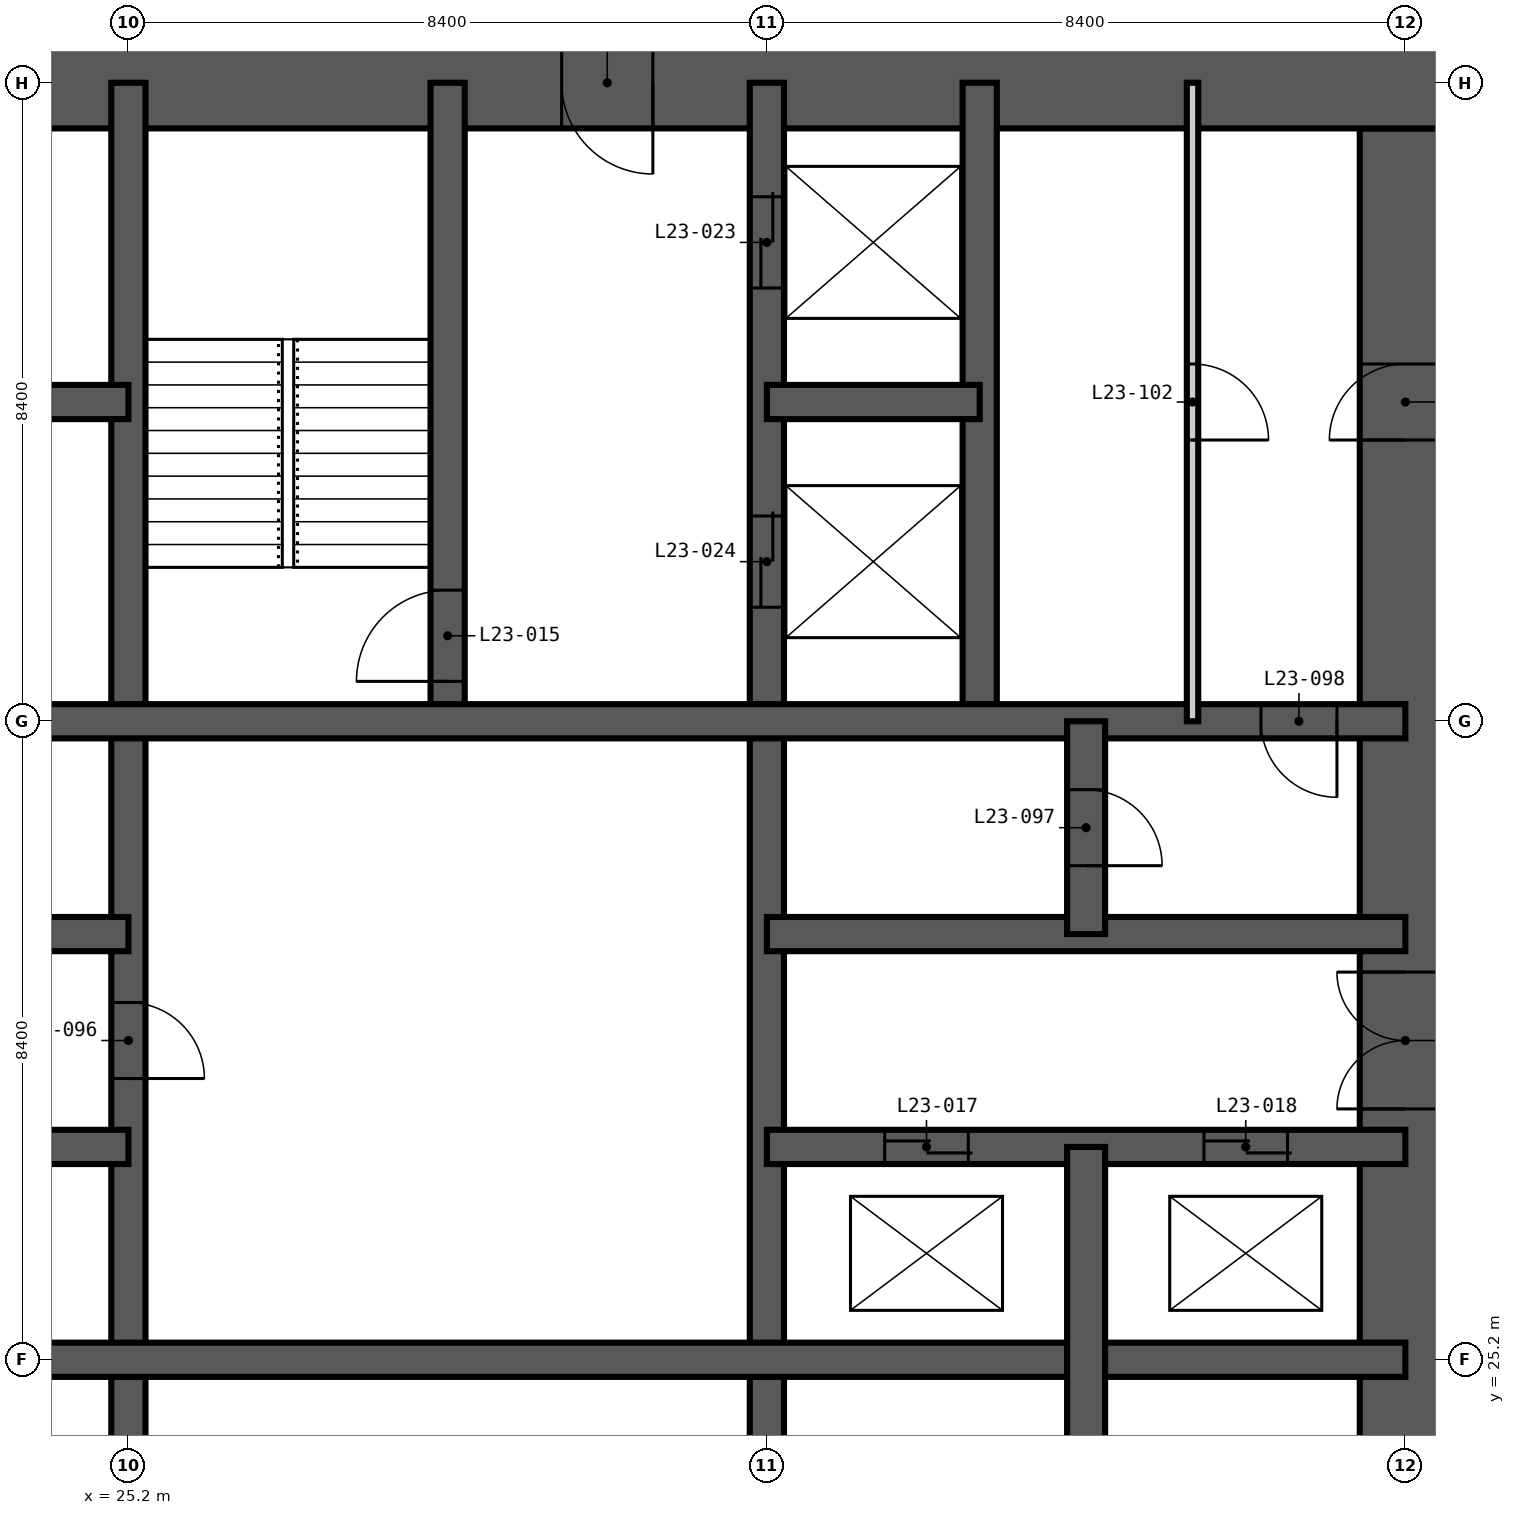
"""IFC4 building model, lengths in metres.
Left out: names, types, materials, properties, quantities, classifications, styles, units other than length and angle.
Written with IfcOpenShell. Run it as: python <this file> out.ifc"""

import sys

from ifc_helpers import new_model, si_unit, direction, frame, frame_2d, origin, place, context, subcontext, project, spatial, rectangle, extrude, element, fill, save


model = new_model("IFC4")
c1 = context("Model", 3, precision=1e-05, world=origin(), true_north=direction((0.0, 1.0)))
c2 = subcontext(c1, "Body", "Model", "MODEL_VIEW")
j1 = project(units=[si_unit("LENGTHUNIT", "METRE"), si_unit("PLANEANGLEUNIT", "RADIAN")], contexts=[c1])
p1 = place(None, origin())
s1 = spatial("IfcSite", under=j1, at=p1, CompositionType="ELEMENT")
p2 = place(p1, origin())
s2 = spatial("IfcBuilding", under=s1, at=p2, CompositionType="ELEMENT")
p3 = place(p2, frame((0.0, 0.0, 93.6)))
s3 = spatial("IfcBuildingStorey", under=s2, at=p3, CompositionType="ELEMENT", Elevation=93.6)
p4 = place(p3, frame((42.0, 17.4, -0.35), z_axis=(0.0, 0.0, 1.0), x_axis=(0.0, 1.0, 0.0)))
e1 = element("IfcWall", 1, at=p4, inside=s3, PredefinedType="SHEAR", context=c2, shape_type="SweptSolid", body=[
    extrude(rectangle(XDim=24.0, YDim=1.2, at=frame_2d((12.0, 0.0))), origin(), (0.0, 0.0, 1.0), 3.6),
])
p5 = place(p4, frame((0.2, 0.0, 0.35)))
e2 = element("IfcOpeningElement", 2, at=p5, cuts=e1, PredefinedType="OPENING", context=c2, shape_type="SweptSolid", body=[
    extrude(rectangle(XDim=1.2, YDim=2.2, at=frame_2d((0.6, 1.1))), frame((0.0, 0.61, 0.0), z_axis=(0.0, -1.0, 0.0), x_axis=(1.0, 0.0, 0.0)), (0.0, 0.0, 1.0), 1.22),
])
p6 = place(p4, frame((11.1, 0.0, 0.35)))
e3 = element("IfcOpeningElement", 3, at=p6, cuts=e1, PredefinedType="OPENING", context=c2, shape_type="SweptSolid", body=[
    extrude(rectangle(XDim=1.8, YDim=2.2, at=frame_2d((0.9, 1.1))), frame((0.0, 0.61, 0.0), z_axis=(0.0, -1.0, 0.0), x_axis=(1.0, 0.0, 0.0)), (0.0, 0.0, 1.0), 1.22),
])
p7 = place(p4, frame((19.9, 0.0, 0.35)))
e4 = element("IfcOpeningElement", 4, at=p7, cuts=e1, PredefinedType="OPENING", context=c2, shape_type="SweptSolid", body=[
    extrude(rectangle(XDim=1.0, YDim=2.1, at=frame_2d((0.5, 1.05))), frame((0.0, 0.61, 0.0), z_axis=(0.0, -1.0, 0.0), x_axis=(1.0, 0.0, 0.0)), (0.0, 0.0, 1.0), 1.22),
])
p8 = place(p3, frame((42.6, 42.0, -0.35), z_axis=(0.0, 0.0, 1.0), x_axis=(-1.0, 0.0, 0.0)))
e5 = element("IfcWall", 5, at=p8, inside=s3, PredefinedType="SHEAR", context=c2, shape_type="SweptSolid", body=[
    extrude(rectangle(XDim=26.4, YDim=1.2, at=frame_2d((13.2, 0.0))), origin(), (0.0, 0.0, 1.0), 3.6),
])
p9 = place(p8, frame((21.1, 0.0, 0.35)))
e6 = element("IfcOpeningElement", 6, at=p9, cuts=e5, PredefinedType="OPENING", context=c2, shape_type="SweptSolid", body=[
    extrude(rectangle(XDim=1.0, YDim=2.1, at=frame_2d((0.5, 1.05))), frame((0.0, 0.61, 0.0), z_axis=(0.0, -1.0, 0.0), x_axis=(1.0, 0.0, 0.0)), (0.0, 0.0, 1.0), 1.22),
])
p10 = place(p8, frame((10.5, 0.0, 0.35)))
e7 = element("IfcOpeningElement", 7, at=p10, cuts=e5, PredefinedType="OPENING", context=c2, shape_type="SweptSolid", body=[
    extrude(rectangle(XDim=1.2, YDim=2.2, at=frame_2d((0.6, 1.1))), frame((0.0, 0.61, 0.0), z_axis=(0.0, -1.0, 0.0), x_axis=(1.0, 0.0, 0.0)), (0.0, 0.0, 1.0), 1.22),
])
p11 = place(p3, frame((25.2, 16.8, -0.35), z_axis=(0.0, 0.0, 1.0), x_axis=(0.0, 1.0, 0.0)))
e8 = element("IfcWall", 8, at=p11, inside=s3, PredefinedType="SHEAR", context=c2, shape_type="SweptSolid", body=[
    extrude(rectangle(XDim=25.2, YDim=0.45, at=frame_2d((12.6, 0.0))), origin(), (0.0, 0.0, 1.0), 3.6),
])
p12 = place(p11, frame((12.1, 0.0, 0.35)))
e9 = element("IfcOpeningElement", 9, at=p12, cuts=e8, PredefinedType="OPENING", context=c2, shape_type="SweptSolid", body=[
    extrude(rectangle(XDim=1.0, YDim=2.1, at=frame_2d((0.5, 1.05))), frame((0.0, 0.235, 0.0), z_axis=(0.0, -1.0, 0.0), x_axis=(1.0, 0.0, 0.0)), (0.0, 0.0, 1.0), 0.47),
])
p13 = place(p3, frame((29.4, 33.6, -0.35), z_axis=(0.0, 0.0, 1.0), x_axis=(0.0, 1.0, 0.0)))
e10 = element("IfcWall", 10, at=p13, inside=s3, PredefinedType="SHEAR", context=c2, shape_type="SweptSolid", body=[
    extrude(rectangle(XDim=8.4, YDim=0.45, at=frame_2d((4.2, 0.0))), origin(), (0.0, 0.0, 1.0), 3.6),
])
p14 = place(p13, frame((0.525, 0.0, 0.35)))
e11 = element("IfcOpeningElement", 11, at=p14, cuts=e10, PredefinedType="OPENING", context=c2, shape_type="SweptSolid", body=[
    extrude(rectangle(XDim=1.2, YDim=2.2, at=frame_2d((0.6, 1.1))), frame((0.0, 0.235, 0.0), z_axis=(0.0, -1.0, 0.0), x_axis=(1.0, 0.0, 0.0)), (0.0, 0.0, 1.0), 0.47),
])
p15 = place(p3, frame((33.6, 16.8, -0.35), z_axis=(0.0, 0.0, 1.0), x_axis=(0.0, 1.0, 0.0)))
e12 = element("IfcWall", 12, at=p15, inside=s3, PredefinedType="SHEAR", context=c2, shape_type="SweptSolid", body=[
    extrude(rectangle(XDim=25.2, YDim=0.45, at=frame_2d((12.6, 0.0))), origin(), (0.0, 0.0, 1.0), 3.6),
])
p16 = place(p15, frame((22.5, 0.0, 0.35)))
e13 = element("IfcOpeningElement", 13, at=p16, cuts=e12, PredefinedType="OPENING", context=c2, shape_type="SweptSolid", body=[
    extrude(rectangle(XDim=1.2, YDim=2.2, at=frame_2d((0.6, 1.1))), frame((0.0, 0.235, 0.0), z_axis=(0.0, -1.0, 0.0), x_axis=(1.0, 0.0, 0.0)), (0.0, 0.0, 1.0), 0.47),
])
p17 = place(p15, frame((18.3, 0.0, 0.35)))
e14 = element("IfcOpeningElement", 14, at=p17, cuts=e12, PredefinedType="OPENING", context=c2, shape_type="SweptSolid", body=[
    extrude(rectangle(XDim=1.2, YDim=2.2, at=frame_2d((0.6, 1.1))), frame((0.0, 0.235, 0.0), z_axis=(0.0, -1.0, 0.0), x_axis=(1.0, 0.0, 0.0)), (0.0, 0.0, 1.0), 0.47),
])
p18 = place(p3, frame((36.4, 33.6, -0.35), z_axis=(0.0, 0.0, 1.0), x_axis=(0.0, 1.0, 0.0)))
e15 = element("IfcWall", 15, at=p18, inside=s3, PredefinedType="SHEAR", context=c2, shape_type="SweptSolid", body=[
    extrude(rectangle(XDim=8.4, YDim=0.45, at=frame_2d((4.2, 0.0))), origin(), (0.0, 0.0, 1.0), 3.6),
])
p19 = place(p3, frame((16.8, 25.2, -0.35), z_axis=(0.0, 0.0, 1.0), x_axis=(1.0, 0.0, 0.0)))
e16 = element("IfcWall", 16, at=p19, inside=s3, PredefinedType="SHEAR", context=c2, shape_type="SweptSolid", body=[
    extrude(rectangle(XDim=25.2, YDim=0.45, at=frame_2d((12.6, 0.0))), origin(), (0.0, 0.0, 1.0), 3.6),
])
p20 = place(p3, frame((16.8, 28.0, -0.35), z_axis=(0.0, 0.0, 1.0), x_axis=(1.0, 0.0, 0.0)))
e17 = element("IfcWall", 17, at=p20, inside=s3, PredefinedType="SHEAR", context=c2, shape_type="SweptSolid", body=[
    extrude(rectangle(XDim=8.4, YDim=0.45, at=frame_2d((4.2, 0.0))), origin(), (0.0, 0.0, 1.0), 3.6),
])
p21 = place(p20, frame((1.55, 0.0, 0.35)))
e18 = element("IfcOpeningElement", 18, at=p21, cuts=e17, PredefinedType="OPENING", context=c2, shape_type="SweptSolid", body=[
    extrude(rectangle(XDim=1.1, YDim=2.2, at=frame_2d((0.55, 1.1))), frame((0.0, 0.235, 0.0), z_axis=(0.0, -1.0, 0.0), x_axis=(1.0, 0.0, 0.0)), (0.0, 0.0, 1.0), 0.47),
])
p22 = place(p20, frame((5.75, 0.0, 0.35)))
e19 = element("IfcOpeningElement", 19, at=p22, cuts=e17, PredefinedType="OPENING", context=c2, shape_type="SweptSolid", body=[
    extrude(rectangle(XDim=1.1, YDim=2.2, at=frame_2d((0.55, 1.1))), frame((0.0, 0.235, 0.0), z_axis=(0.0, -1.0, 0.0), x_axis=(1.0, 0.0, 0.0)), (0.0, 0.0, 1.0), 0.47),
])
p23 = place(p3, frame((33.6, 28.0, -0.35), z_axis=(0.0, 0.0, 1.0), x_axis=(1.0, 0.0, 0.0)))
e20 = element("IfcWall", 20, at=p23, inside=s3, PredefinedType="SHEAR", context=c2, shape_type="SweptSolid", body=[
    extrude(rectangle(XDim=8.4, YDim=0.45, at=frame_2d((4.2, 0.0))), origin(), (0.0, 0.0, 1.0), 3.6),
])
p24 = place(p23, frame((1.55, 0.0, 0.35)))
e21 = element("IfcOpeningElement", 21, at=p24, cuts=e20, PredefinedType="OPENING", context=c2, shape_type="SweptSolid", body=[
    extrude(rectangle(XDim=1.1, YDim=2.2, at=frame_2d((0.55, 1.1))), frame((0.0, 0.235, 0.0), z_axis=(0.0, -1.0, 0.0), x_axis=(1.0, 0.0, 0.0)), (0.0, 0.0, 1.0), 0.47),
])
p25 = place(p23, frame((5.75, 0.0, 0.35)))
e22 = element("IfcOpeningElement", 22, at=p25, cuts=e20, PredefinedType="OPENING", context=c2, shape_type="SweptSolid", body=[
    extrude(rectangle(XDim=1.1, YDim=2.2, at=frame_2d((0.55, 1.1))), frame((0.0, 0.235, 0.0), z_axis=(0.0, -1.0, 0.0), x_axis=(1.0, 0.0, 0.0)), (0.0, 0.0, 1.0), 0.47),
])
p26 = place(p3, frame((16.8, 30.8, -0.35), z_axis=(0.0, 0.0, 1.0), x_axis=(1.0, 0.0, 0.0)))
e23 = element("IfcWall", 23, at=p26, inside=s3, PredefinedType="SHEAR", context=c2, shape_type="SweptSolid", body=[
    extrude(rectangle(XDim=8.4, YDim=0.45, at=frame_2d((4.2, 0.0))), origin(), (0.0, 0.0, 1.0), 3.6),
])
p27 = place(p26, frame((1.55, 0.0, 0.35)))
e24 = element("IfcOpeningElement", 24, at=p27, cuts=e23, PredefinedType="OPENING", context=c2, shape_type="SweptSolid", body=[
    extrude(rectangle(XDim=1.1, YDim=2.2, at=frame_2d((0.55, 1.1))), frame((0.0, 0.235, 0.0), z_axis=(0.0, -1.0, 0.0), x_axis=(1.0, 0.0, 0.0)), (0.0, 0.0, 1.0), 0.47),
])
p28 = place(p26, frame((5.75, 0.0, 0.35)))
e25 = element("IfcOpeningElement", 25, at=p28, cuts=e23, PredefinedType="OPENING", context=c2, shape_type="SweptSolid", body=[
    extrude(rectangle(XDim=1.1, YDim=2.2, at=frame_2d((0.55, 1.1))), frame((0.0, 0.235, 0.0), z_axis=(0.0, -1.0, 0.0), x_axis=(1.0, 0.0, 0.0)), (0.0, 0.0, 1.0), 0.47),
])
p29 = place(p3, frame((33.6, 30.8, -0.35), z_axis=(0.0, 0.0, 1.0), x_axis=(1.0, 0.0, 0.0)))
e26 = element("IfcWall", 26, at=p29, inside=s3, PredefinedType="SHEAR", context=c2, shape_type="SweptSolid", body=[
    extrude(rectangle(XDim=8.4, YDim=0.45, at=frame_2d((4.2, 0.0))), origin(), (0.0, 0.0, 1.0), 3.6),
])
p30 = place(p3, frame((16.8, 33.6, -0.35), z_axis=(0.0, 0.0, 1.0), x_axis=(1.0, 0.0, 0.0)))
e27 = element("IfcWall", 27, at=p30, inside=s3, PredefinedType="SHEAR", context=c2, shape_type="SweptSolid", body=[
    extrude(rectangle(XDim=25.2, YDim=0.45, at=frame_2d((12.6, 0.0))), origin(), (0.0, 0.0, 1.0), 3.6),
])
p31 = place(p30, frame((23.3, 0.0, 0.35)))
e28 = element("IfcOpeningElement", 28, at=p31, cuts=e27, PredefinedType="OPENING", context=c2, shape_type="SweptSolid", body=[
    extrude(rectangle(XDim=1.0, YDim=2.1, at=frame_2d((0.5, 1.05))), frame((0.0, 0.235, 0.0), z_axis=(0.0, -1.0, 0.0), x_axis=(1.0, 0.0, 0.0)), (0.0, 0.0, 1.0), 0.47),
])
p32 = place(p3, frame((16.8, 37.8, -0.35), z_axis=(0.0, 0.0, 1.0), x_axis=(1.0, 0.0, 0.0)))
e29 = element("IfcWall", 29, at=p32, inside=s3, PredefinedType="SHEAR", context=c2, shape_type="SweptSolid", body=[
    extrude(rectangle(XDim=8.4, YDim=0.45, at=frame_2d((4.2, 0.0))), origin(), (0.0, 0.0, 1.0), 3.6),
])
p33 = place(p3, frame((33.6, 37.8, -0.35), z_axis=(0.0, 0.0, 1.0), x_axis=(1.0, 0.0, 0.0)))
e30 = element("IfcWall", 30, at=p33, inside=s3, PredefinedType="SHEAR", context=c2, shape_type="SweptSolid", body=[
    extrude(rectangle(XDim=2.8, YDim=0.45, at=frame_2d((1.4, 0.0))), origin(), (0.0, 0.0, 1.0), 3.6),
])
p34 = place(p3, frame((37.8, 16.8, -0.35), z_axis=(0.0, 0.0, 1.0), x_axis=(0.0, 1.0, 0.0)))
e31 = element("IfcWall", 31, at=p34, inside=s3, PredefinedType="SHEAR", context=c2, shape_type="SweptSolid", body=[
    extrude(rectangle(XDim=11.2, YDim=0.5, at=frame_2d((5.6, 0.0))), origin(), (0.0, 0.0, 1.0), 3.6),
])
p35 = place(p3, frame((37.8, 30.8, -0.35), z_axis=(0.0, 0.0, 1.0), x_axis=(0.0, 1.0, 0.0)))
e32 = element("IfcWall", 32, at=p35, inside=s3, PredefinedType="SHEAR", context=c2, shape_type="SweptSolid", body=[
    extrude(rectangle(XDim=2.8, YDim=0.5, at=frame_2d((1.4, 0.0))), origin(), (0.0, 0.0, 1.0), 3.6),
])
p36 = place(p35, frame((0.9, 0.0, 0.35)))
e33 = element("IfcOpeningElement", 33, at=p36, cuts=e32, PredefinedType="OPENING", context=c2, shape_type="SweptSolid", body=[
    extrude(rectangle(XDim=1.0, YDim=2.1, at=frame_2d((0.5, 1.05))), frame((0.0, 0.26, 0.0), z_axis=(0.0, -1.0, 0.0), x_axis=(1.0, 0.0, 0.0)), (0.0, 0.0, 1.0), 0.52),
])
p37 = place(p3, frame((39.2, 33.6, 0.0), z_axis=(0.0, 0.0, 1.0), x_axis=(0.0, 1.0, 0.0)))
e34 = element("IfcWall", 34, at=p37, inside=s3, PredefinedType="PARTITIONING", context=c2, shape_type="SweptSolid", body=[
    extrude(rectangle(XDim=8.4, YDim=0.15, at=frame_2d((4.2, 0.0))), origin(), (0.0, 0.0, 1.0), 3.25),
])
p38 = place(p37, frame((3.7, 0.0, 0.0)))
e35 = element("IfcOpeningElement", 35, at=p38, cuts=e34, PredefinedType="OPENING", context=c2, shape_type="SweptSolid", body=[
    extrude(rectangle(XDim=1.0, YDim=2.1, at=frame_2d((0.5, 1.05))), frame((0.0, 0.085, 0.0), z_axis=(0.0, -1.0, 0.0), x_axis=(1.0, 0.0, 0.0)), (0.0, 0.0, 1.0), 0.17),
])
p39 = place(p14, origin())
e36 = element("IfcDoor", 36, at=p39, inside=s3, OperationType="SINGLE_SWING_LEFT", PredefinedType="DOOR", context=c2, shape_type="SweptSolid", body=[
    extrude(rectangle(XDim=1.2, YDim=2.2, at=frame_2d((0.6, 1.1))), frame((0.0, 0.025, 0.0), z_axis=(0.0, -1.0, 0.0), x_axis=(1.0, 0.0, 0.0)), (0.0, 0.0, 1.0), 0.05),
])
fill(e11, e36)
p40 = place(p24, origin())
e37 = element("IfcDoor", 37, at=p40, inside=s3, OperationType="DOUBLE_DOOR_SLIDING", PredefinedType="DOOR", context=c2, shape_type="SweptSolid", body=[
    extrude(rectangle(XDim=1.1, YDim=2.2, at=frame_2d((0.55, 1.1))), frame((0.0, 0.025, 0.0), z_axis=(0.0, -1.0, 0.0), x_axis=(1.0, 0.0, 0.0)), (0.0, 0.0, 1.0), 0.05),
])
fill(e21, e37)
p41 = place(p25, origin())
e38 = element("IfcDoor", 38, at=p41, inside=s3, OperationType="DOUBLE_DOOR_SLIDING", PredefinedType="DOOR", context=c2, shape_type="SweptSolid", body=[
    extrude(rectangle(XDim=1.1, YDim=2.2, at=frame_2d((0.55, 1.1))), frame((0.0, 0.025, 0.0), z_axis=(0.0, -1.0, 0.0), x_axis=(1.0, 0.0, 0.0)), (0.0, 0.0, 1.0), 0.05),
])
fill(e22, e38)
p42 = place(p16, origin())
e39 = element("IfcDoor", 39, at=p42, inside=s3, OperationType="DOUBLE_DOOR_SLIDING", PredefinedType="DOOR", context=c2, shape_type="SweptSolid", body=[
    extrude(rectangle(XDim=1.2, YDim=2.2, at=frame_2d((0.6, 1.1))), frame((0.0, 0.025, 0.0), z_axis=(0.0, -1.0, 0.0), x_axis=(1.0, 0.0, 0.0)), (0.0, 0.0, 1.0), 0.05),
])
fill(e13, e39)
p43 = place(p17, origin())
e40 = element("IfcDoor", 40, at=p43, inside=s3, OperationType="DOUBLE_DOOR_SLIDING", PredefinedType="DOOR", context=c2, shape_type="SweptSolid", body=[
    extrude(rectangle(XDim=1.2, YDim=2.2, at=frame_2d((0.6, 1.1))), frame((0.0, 0.025, 0.0), z_axis=(0.0, -1.0, 0.0), x_axis=(1.0, 0.0, 0.0)), (0.0, 0.0, 1.0), 0.05),
])
fill(e14, e40)
p44 = place(p12, frame((1.0, 0.0, 0.0), z_axis=(0.0, 0.0, 1.0), x_axis=(-1.0, 0.0, 0.0)))
e41 = element("IfcDoor", 41, at=p44, inside=s3, OperationType="SINGLE_SWING_RIGHT", PredefinedType="DOOR", context=c2, shape_type="SweptSolid", body=[
    extrude(rectangle(XDim=1.0, YDim=2.1, at=frame_2d((0.5, 1.05))), frame((0.0, 0.025, 0.0), z_axis=(0.0, -1.0, 0.0), x_axis=(1.0, 0.0, 0.0)), (0.0, 0.0, 1.0), 0.05),
])
fill(e9, e41)
p45 = place(p36, frame((1.0, 0.0, 0.0), z_axis=(0.0, 0.0, 1.0), x_axis=(-1.0, 0.0, 0.0)))
e42 = element("IfcDoor", 42, at=p45, inside=s3, OperationType="SINGLE_SWING_RIGHT", PredefinedType="DOOR", context=c2, shape_type="SweptSolid", body=[
    extrude(rectangle(XDim=1.0, YDim=2.1, at=frame_2d((0.5, 1.05))), frame((0.0, 0.025, 0.0), z_axis=(0.0, -1.0, 0.0), x_axis=(1.0, 0.0, 0.0)), (0.0, 0.0, 1.0), 0.05),
])
fill(e33, e42)
p46 = place(p31, frame((1.0, 0.0, 0.0), z_axis=(0.0, 0.0, 1.0), x_axis=(-1.0, 0.0, 0.0)))
e43 = element("IfcDoor", 43, at=p46, inside=s3, OperationType="SINGLE_SWING_LEFT", PredefinedType="DOOR", context=c2, shape_type="SweptSolid", body=[
    extrude(rectangle(XDim=1.0, YDim=2.1, at=frame_2d((0.5, 1.05))), frame((0.0, 0.025, 0.0), z_axis=(0.0, -1.0, 0.0), x_axis=(1.0, 0.0, 0.0)), (0.0, 0.0, 1.0), 0.05),
])
fill(e28, e43)
p47 = place(p6, origin())
e44 = element("IfcDoor", 44, at=p47, inside=s3, OperationType="DOUBLE_DOOR_DOUBLE_SWING", PredefinedType="DOOR", context=c2, shape_type="SweptSolid", body=[
    extrude(rectangle(XDim=1.8, YDim=2.2, at=frame_2d((0.9, 1.1))), frame((0.0, 0.025, 0.0), z_axis=(0.0, -1.0, 0.0), x_axis=(1.0, 0.0, 0.0)), (0.0, 0.0, 1.0), 0.05),
])
fill(e3, e44)
p48 = place(p10, origin())
e45 = element("IfcDoor", 45, at=p48, inside=s3, OperationType="SINGLE_SWING_LEFT", PredefinedType="DOOR", context=c2, shape_type="SweptSolid", body=[
    extrude(rectangle(XDim=1.2, YDim=2.2, at=frame_2d((0.6, 1.1))), frame((0.0, 0.025, 0.0), z_axis=(0.0, -1.0, 0.0), x_axis=(1.0, 0.0, 0.0)), (0.0, 0.0, 1.0), 0.05),
])
fill(e7, e45)
p49 = place(p7, origin())
e46 = element("IfcDoor", 46, at=p49, inside=s3, OperationType="SINGLE_SWING_LEFT", PredefinedType="DOOR", context=c2, shape_type="SweptSolid", body=[
    extrude(rectangle(XDim=1.0, YDim=2.1, at=frame_2d((0.5, 1.05))), frame((0.0, 0.025, 0.0), z_axis=(0.0, -1.0, 0.0), x_axis=(1.0, 0.0, 0.0)), (0.0, 0.0, 1.0), 0.05),
])
fill(e4, e46)
p50 = place(p38, frame((1.0, 0.0, 0.0), z_axis=(0.0, 0.0, 1.0), x_axis=(-1.0, 0.0, 0.0)))
e47 = element("IfcDoor", 47, at=p50, inside=s3, OperationType="SINGLE_SWING_RIGHT", PredefinedType="DOOR", context=c2, shape_type="SweptSolid", body=[
    extrude(rectangle(XDim=1.0, YDim=2.1, at=frame_2d((0.5, 1.05))), frame((0.0, 0.025, 0.0), z_axis=(0.0, -1.0, 0.0), x_axis=(1.0, 0.0, 0.0)), (0.0, 0.0, 1.0), 0.05),
])
fill(e35, e47)
save(model, sys.argv[1])
